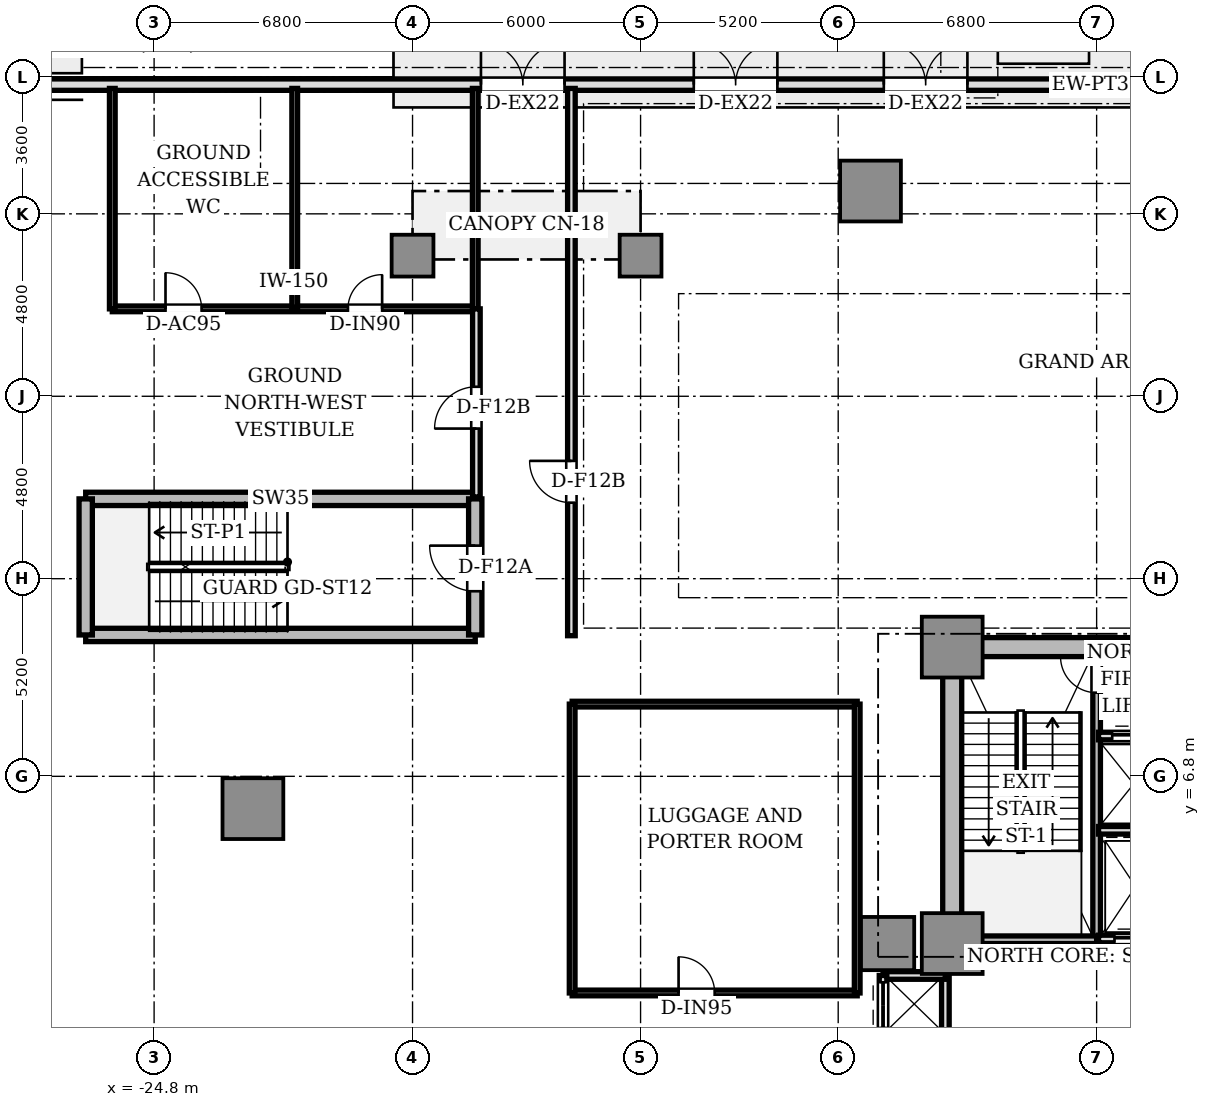
"""IFC4 building model, lengths in metres.
Left out: names, types, materials, properties, quantities, classifications, styles, units other than length and angle.
Written with IfcOpenShell. Run it as: python <this file> out.ifc"""

import sys

from ifc_helpers import new_model, si_unit, direction, frame, frame_2d, origin, origin_2d, place, context, subcontext, project, spatial, rectangle, circle, extrude, source, transform, mapped, element, fill, save


model = new_model("IFC4")
c1 = context("Model", 3, precision=1e-05, world=origin(), true_north=direction((0.0, 1.0)))
c2 = subcontext(c1, "Body", "Model", "MODEL_VIEW")
j1 = project(units=[si_unit("LENGTHUNIT", "METRE"), si_unit("PLANEANGLEUNIT", "RADIAN")], contexts=[c1])
p1 = place(None, origin())
s1 = spatial("IfcSite", under=j1, at=p1, CompositionType="ELEMENT")
p2 = place(p1, origin())
s2 = spatial("IfcBuilding", under=s1, at=p2, CompositionType="ELEMENT")
p3 = place(p2, origin())
s3 = spatial("IfcBuildingStorey", under=s2, at=p3, CompositionType="ELEMENT", Elevation=0.0)
p4 = place(p3, frame((-3.55, 10.2, 0.0), z_axis=(0.0, 0.0, 1.0), x_axis=(1.0, 0.0, 0.0)))
e1 = element("IfcWall", 1, at=p4, inside=s3, PredefinedType="SHEAR", context=c2, shape_type="SweptSolid", body=[
    extrude(rectangle(XDim=7.1, YDim=0.5, at=frame_2d((3.55, 0.0))), origin(), (0.0, 0.0, 1.0), 4.48),
])
p5 = place(p3, frame((-3.8, 2.85, 0.0), z_axis=(0.0, 0.0, 1.0), x_axis=(0.0, 1.0, 0.0)))
e2 = element("IfcWall", 2, at=p5, inside=s3, PredefinedType="SHEAR", context=c2, shape_type="SweptSolid", body=[
    extrude(rectangle(XDim=6.9, YDim=0.5, at=frame_2d((3.45, 0.0))), origin(), (0.0, 0.0, 1.0), 4.48),
])
m1 = source(origin(), c2, "Body", "SweptSolid", [
    extrude(rectangle(XDim=1.6, YDim=1.6, at=origin_2d()), origin(), (0.0, 0.0, 1.0), 4.48),
])
for number, where, z_axis, x_axis in (
    (3, (-3.8, 2.4, 0.0), (0.0, 0.0, 1.0), (1.0, 0.0, 0.0)),
    (4, (-3.8, 10.2, 0.0), (0.0, 0.0, 1.0), (1.0, 0.0, 0.0)),
):
    element("IfcColumn", number, at=place(p3, frame(where, z_axis=z_axis, x_axis=x_axis)), inside=s3, PredefinedType="COLUMN", context=c2, shape_type="MappedRepresentation", body=[
        mapped(m1, transform((0.0, 0.0, 0.0), scale=1.0)),
    ])
m2 = source(origin(), c2, "Body", "SweptSolid", [
    extrude(rectangle(XDim=1.4, YDim=1.4, at=origin_2d()), origin(), (0.0, 0.0, 1.0), 4.48),
])
p6 = place(p3, frame((-5.5, 2.4, 0.0), z_axis=(0.0, 0.0, 1.0), x_axis=(1.0, 0.0, 0.0)))
e5 = element("IfcColumn", 5, at=p6, inside=s3, PredefinedType="COLUMN", context=c2, shape_type="MappedRepresentation", body=[
    mapped(m2, transform((0.0, 0.0, 0.0), scale=1.0)),
])
for number, where, z_axis, x_axis in (
    (6, (-5.95, 22.2, 0.0), (0.0, 0.0, 1.0), (1.0, 0.0, 0.0)),
    (7, (-22.2, 5.95, 0.0), (0.0, 0.0, 1.0), (1.0, 0.0, 0.0)),
):
    element("IfcColumn", number, at=place(p3, frame(where, z_axis=z_axis, x_axis=x_axis)), inside=s3, PredefinedType="COLUMN", context=c2, shape_type="MappedRepresentation", body=[
        mapped(m1, transform((0.0, 0.0, 0.0), scale=1.0)),
    ])
m3 = source(origin(), c2, "Body", "SweptSolid", [
    extrude(circle(Radius=0.55, at=origin_2d()), origin(), (0.0, 0.0, 1.0), 4.48),
])
for number, where, z_axis, x_axis in (
    (8, (-18.0, 20.5, 0.0), (0.0, 0.0, 1.0), (1.0, 0.0, 0.0)),
    (9, (-12.0, 20.5, 0.0), (0.0, 0.0, 1.0), (1.0, 0.0, 0.0)),
):
    element("IfcColumn", number, at=place(p3, frame(where, z_axis=z_axis, x_axis=x_axis)), inside=s3, PredefinedType="COLUMN", context=c2, shape_type="MappedRepresentation", body=[
        mapped(m3, transform((0.0, 0.0, 0.0), scale=1.0)),
    ])
p7 = place(p3, frame((-33.4, 25.0, 0.0), z_axis=(0.0, 0.0, 1.0), x_axis=(1.0, 0.0, 0.0)))
e10 = element("IfcWall", 10, at=p7, inside=s3, PredefinedType="STANDARD", context=c2, shape_type="SweptSolid", body=[
    extrude(rectangle(XDim=66.8, YDim=0.3, at=frame_2d((33.4, 0.0))), origin(), (0.0, 0.0, 1.0), 3.8),
])
p8 = place(p7, frame((17.2, 0.0, 0.0)))
e11 = element("IfcOpeningElement", 11, at=p8, cuts=e10, PredefinedType="OPENING", context=c2, shape_type="SweptSolid", body=[
    extrude(rectangle(XDim=2.2, YDim=2.4, at=frame_2d((1.1, 1.2))), frame((0.0, 0.16, 0.0), z_axis=(0.0, -1.0, 0.0), x_axis=(1.0, 0.0, 0.0)), (0.0, 0.0, 1.0), 0.32),
])
p9 = place(p7, frame((22.8, 0.0, 0.0)))
e12 = element("IfcOpeningElement", 12, at=p9, cuts=e10, PredefinedType="OPENING", context=c2, shape_type="SweptSolid", body=[
    extrude(rectangle(XDim=2.2, YDim=2.4, at=frame_2d((1.1, 1.2))), frame((0.0, 0.16, 0.0), z_axis=(0.0, -1.0, 0.0), x_axis=(1.0, 0.0, 0.0)), (0.0, 0.0, 1.0), 0.32),
])
p10 = place(p7, frame((27.8, 0.0, 0.0)))
e13 = element("IfcOpeningElement", 13, at=p10, cuts=e10, PredefinedType="OPENING", context=c2, shape_type="SweptSolid", body=[
    extrude(rectangle(XDim=2.2, YDim=2.4, at=frame_2d((1.1, 1.2))), frame((0.0, 0.16, 0.0), z_axis=(0.0, -1.0, 0.0), x_axis=(1.0, 0.0, 0.0)), (0.0, 0.0, 1.0), 0.32),
])
p11 = place(p7, frame((36.8, 0.0, 0.0)))
e14 = element("IfcOpeningElement", 14, at=p11, cuts=e10, PredefinedType="OPENING", context=c2, shape_type="SweptSolid", body=[
    extrude(rectangle(XDim=2.2, YDim=2.4, at=frame_2d((1.1, 1.2))), frame((0.0, 0.16, 0.0), z_axis=(0.0, -1.0, 0.0), x_axis=(1.0, 0.0, 0.0)), (0.0, 0.0, 1.0), 0.32),
])
p12 = place(p7, frame((45.8, 0.0, 0.0)))
e15 = element("IfcOpeningElement", 15, at=p12, cuts=e10, PredefinedType="OPENING", context=c2, shape_type="SweptSolid", body=[
    extrude(rectangle(XDim=2.2, YDim=2.4, at=frame_2d((1.1, 1.2))), frame((0.0, 0.16, 0.0), z_axis=(0.0, -1.0, 0.0), x_axis=(1.0, 0.0, 0.0)), (0.0, 0.0, 1.0), 0.32),
])
p13 = place(p7, frame((55.8, 0.0, 0.0)))
e16 = element("IfcOpeningElement", 16, at=p13, cuts=e10, PredefinedType="OPENING", context=c2, shape_type="SweptSolid", body=[
    extrude(rectangle(XDim=1.2, YDim=2.2, at=frame_2d((0.6, 1.1))), frame((0.0, 0.16, 0.0), z_axis=(0.0, -1.0, 0.0), x_axis=(1.0, 0.0, 0.0)), (0.0, 0.0, 1.0), 0.32),
])
p14 = place(p3, frame((0.0, 2.5, 0.0), z_axis=(0.0, 0.0, 1.0), x_axis=(0.0, 1.0, 0.0)))
e17 = element("IfcWall", 17, at=p14, inside=s3, PredefinedType="SOLIDWALL", context=c2, shape_type="SweptSolid", body=[
    extrude(rectangle(XDim=7.68, YDim=0.2, at=frame_2d((3.84, 0.0))), origin(), (0.0, 0.0, 1.0), 4.48),
])
p15 = place(p14, frame((6.5, 0.0, 0.0)))
e18 = element("IfcOpeningElement", 18, at=p15, cuts=e17, PredefinedType="OPENING", context=c2, shape_type="SweptSolid", body=[
    extrude(rectangle(XDim=0.95, YDim=2.15, at=frame_2d((0.475, 1.075))), frame((0.0, 0.11, 0.0), z_axis=(0.0, -1.0, 0.0), x_axis=(1.0, 0.0, 0.0)), (0.0, 0.0, 1.0), 0.22),
])
p16 = place(p3, frame((-3.72, 2.5, 0.0), z_axis=(0.0, 0.0, 1.0), x_axis=(1.0, 0.0, 0.0)))
e19 = element("IfcWall", 19, at=p16, inside=s3, PredefinedType="SOLIDWALL", context=c2, shape_type="SweptSolid", body=[
    extrude(rectangle(XDim=3.72, YDim=0.2, at=frame_2d((1.86, 0.0))), origin(), (0.0, 0.0, 1.0), 4.48),
])
p17 = place(p3, frame((0.05, 2.52, 0.0), z_axis=(0.0, 0.0, 1.0), x_axis=(1.0, 0.0, 0.0)))
e20 = element("IfcWall", 20, at=p17, inside=s3, PredefinedType="SOLIDWALL", context=c2, shape_type="SweptSolid", body=[
    extrude(rectangle(XDim=1.95, YDim=0.2, at=frame_2d((0.975, 0.0))), origin(), (0.0, 0.0, 1.0), 4.03),
])
p18 = place(p17, frame((0.42, 0.0, 0.0)))
e21 = element("IfcOpeningElement", 21, at=p18, cuts=e20, PredefinedType="OPENING", context=c2, shape_type="SweptSolid", body=[
    extrude(rectangle(XDim=1.1, YDim=2.2, at=frame_2d((0.55, 1.1))), frame((0.0, 0.11, 0.0), z_axis=(0.0, -1.0, 0.0), x_axis=(1.0, 0.0, 0.0)), (0.0, 0.0, 1.0), 0.22),
])
p19 = place(p3, frame((0.05, 5.38, 0.0), z_axis=(0.0, 0.0, 1.0), x_axis=(1.0, 0.0, 0.0)))
e22 = element("IfcWall", 22, at=p19, inside=s3, PredefinedType="SOLIDWALL", context=c2, shape_type="SweptSolid", body=[
    extrude(rectangle(XDim=3.69, YDim=0.2, at=frame_2d((1.845, 0.0))), origin(), (0.0, 0.0, 1.0), 4.03),
])
p20 = place(p3, frame((0.05, 7.86, 0.0), z_axis=(0.0, 0.0, 1.0), x_axis=(1.0, 0.0, 0.0)))
e23 = element("IfcWall", 23, at=p20, inside=s3, PredefinedType="SOLIDWALL", context=c2, shape_type="SweptSolid", body=[
    extrude(rectangle(XDim=1.85, YDim=0.2, at=frame_2d((0.925, 0.0))), origin(), (0.0, 0.0, 1.0), 4.03),
])
p21 = place(p20, frame((0.36, 0.0, 0.0)))
e24 = element("IfcOpeningElement", 24, at=p21, cuts=e23, PredefinedType="OPENING", context=c2, shape_type="SweptSolid", body=[
    extrude(rectangle(XDim=1.1, YDim=2.2, at=frame_2d((0.55, 1.1))), frame((0.0, 0.11, 0.0), z_axis=(0.0, -1.0, 0.0), x_axis=(1.0, 0.0, 0.0)), (0.0, 0.0, 1.0), 0.22),
])
p22 = place(p3, frame((-3.98, -1.56, 0.0), z_axis=(0.0, 0.0, 1.0), x_axis=(0.0, 1.0, 0.0)))
e25 = element("IfcWall", 25, at=p22, inside=s3, PredefinedType="SOLIDWALL", context=c2, shape_type="SweptSolid", body=[
    extrude(rectangle(XDim=3.12, YDim=0.2, at=frame_2d((1.56, 0.0))), origin(), (0.0, 0.0, 1.0), 3.55),
])
p23 = place(p3, frame((-5.62, 1.56, 0.0), z_axis=(0.0, 0.0, 1.0), x_axis=(1.0, 0.0, 0.0)))
e26 = element("IfcWall", 26, at=p23, inside=s3, PredefinedType="SOLIDWALL", context=c2, shape_type="SweptSolid", body=[
    extrude(rectangle(XDim=1.64, YDim=0.2, at=frame_2d((0.82, 0.0))), origin(), (0.0, 0.0, 1.0), 4.03),
])
p24 = place(p3, frame((-5.62, 0.0, 0.0), z_axis=(0.0, 0.0, 1.0), x_axis=(0.0, 1.0, 0.0)))
e27 = element("IfcWall", 27, at=p24, inside=s3, PredefinedType="SOLIDWALL", context=c2, shape_type="SweptSolid", body=[
    extrude(rectangle(XDim=1.56, YDim=0.2, at=frame_2d((0.78, 0.0))), origin(), (0.0, 0.0, 1.0), 4.03),
])
p25 = place(p24, frame((0.18, 0.0, 0.0)))
e28 = element("IfcOpeningElement", 28, at=p25, cuts=e27, PredefinedType="OPENING", context=c2, shape_type="SweptSolid", body=[
    extrude(rectangle(XDim=1.2, YDim=2.2, at=frame_2d((0.6, 1.1))), frame((0.0, 0.11, 0.0), z_axis=(0.0, -1.0, 0.0), x_axis=(1.0, 0.0, 0.0)), (0.0, 0.0, 1.0), 0.22),
])
for number, where, z_axis, x_axis in (
    (29, (-26.6, 14.1, 0.0), (0.0, 0.0, 1.0), (1.0, 0.0, 0.0)),
    (30, (-26.6, 10.52, 0.0), (0.0, 0.0, 1.0), (1.0, 0.0, 0.0)),
):
    element("IfcWall", number, at=place(p3, frame(where, z_axis=z_axis, x_axis=x_axis)), inside=s3, PredefinedType="SHEAR", context=c2, shape_type="SweptSolid", body=[
        extrude(rectangle(XDim=10.25, YDim=0.35, at=frame_2d((5.125, 0.0))), origin(), (0.0, 0.0, 1.0), 4.48),
    ])
p26 = place(p3, frame((-26.6, 10.52, 0.0), z_axis=(0.0, 0.0, 1.0), x_axis=(0.0, 1.0, 0.0)))
e31 = element("IfcWall", 31, at=p26, inside=s3, PredefinedType="SHEAR", context=c2, shape_type="SweptSolid", body=[
    extrude(rectangle(XDim=3.58, YDim=0.35, at=frame_2d((1.79, 0.0))), origin(), (0.0, 0.0, 1.0), 4.48),
])
p27 = place(p3, frame((-16.35, 10.52, 0.0), z_axis=(0.0, 0.0, 1.0), x_axis=(0.0, 1.0, 0.0)))
e32 = element("IfcWall", 32, at=p27, inside=s3, PredefinedType="SHEAR", context=c2, shape_type="SweptSolid", body=[
    extrude(rectangle(XDim=3.58, YDim=0.35, at=frame_2d((1.79, 0.0))), origin(), (0.0, 0.0, 1.0), 4.48),
])
p28 = place(p27, frame((1.15, 0.0, 0.0)))
e33 = element("IfcOpeningElement", 33, at=p28, cuts=e32, PredefinedType="OPENING", context=c2, shape_type="SweptSolid", body=[
    extrude(rectangle(XDim=1.2, YDim=2.2, at=frame_2d((0.6, 1.1))), frame((0.0, 0.185, 0.0), z_axis=(0.0, -1.0, 0.0), x_axis=(1.0, 0.0, 0.0)), (0.0, 0.0, 1.0), 0.37),
])
p29 = place(p3, frame((-25.9, 19.1, 0.0), z_axis=(0.0, 0.0, 1.0), x_axis=(1.0, 0.0, 0.0)))
e34 = element("IfcWall", 34, at=p29, inside=s3, PredefinedType="PARTITIONING", context=c2, shape_type="SweptSolid", body=[
    extrude(rectangle(XDim=9.55, YDim=0.15, at=frame_2d((4.775, 0.0))), origin(), (0.0, 0.0, 1.0), 4.03),
])
p30 = place(p29, frame((1.4, 0.0, 0.0)))
e35 = element("IfcOpeningElement", 35, at=p30, cuts=e34, PredefinedType="OPENING", context=c2, shape_type="SweptSolid", body=[
    extrude(rectangle(XDim=0.95, YDim=2.15, at=frame_2d((0.475, 1.075))), frame((0.0, 0.085, 0.0), z_axis=(0.0, -1.0, 0.0), x_axis=(1.0, 0.0, 0.0)), (0.0, 0.0, 1.0), 0.17),
])
p31 = place(p29, frame((6.2, 0.0, 0.0)))
e36 = element("IfcOpeningElement", 36, at=p31, cuts=e34, PredefinedType="OPENING", context=c2, shape_type="SweptSolid", body=[
    extrude(rectangle(XDim=0.9, YDim=2.1, at=frame_2d((0.45, 1.05))), frame((0.0, 0.085, 0.0), z_axis=(0.0, -1.0, 0.0), x_axis=(1.0, 0.0, 0.0)), (0.0, 0.0, 1.0), 0.17),
])
for number, where, z_axis, x_axis in (
    (37, (-25.9, 19.1, 0.0), (0.0, 0.0, 1.0), (0.0, 1.0, 0.0)),
    (38, (-21.1, 19.1, 0.0), (0.0, 0.0, 1.0), (0.0, 1.0, 0.0)),
):
    element("IfcWall", number, at=place(p3, frame(where, z_axis=z_axis, x_axis=x_axis)), inside=s3, PredefinedType="PARTITIONING", context=c2, shape_type="SweptSolid", body=[
        extrude(rectangle(XDim=5.8, YDim=0.15, at=frame_2d((2.9, 0.0))), origin(), (0.0, 0.0, 1.0), 4.03),
    ])
p32 = place(p3, frame((-16.35, 19.1, 0.0), z_axis=(0.0, 0.0, 1.0), x_axis=(0.0, 1.0, 0.0)))
e39 = element("IfcWall", 39, at=p32, inside=s3, PredefinedType="PARTITIONING", context=c2, shape_type="SweptSolid", body=[
    extrude(rectangle(XDim=5.8, YDim=0.15, at=frame_2d((2.9, 0.0))), origin(), (0.0, 0.0, 1.0), 3.95),
])
p33 = place(p3, frame((-13.8, 1.1, 0.0), z_axis=(0.0, 0.0, 1.0), x_axis=(1.0, 0.0, 0.0)))
e40 = element("IfcWall", 40, at=p33, inside=s3, PredefinedType="PARTITIONING", context=c2, shape_type="SweptSolid", body=[
    extrude(rectangle(XDim=7.5, YDim=0.15, at=frame_2d((3.75, 0.0))), origin(), (0.0, 0.0, 1.0), 4.03),
])
p34 = place(p33, frame((2.8, 0.0, 0.0)))
e41 = element("IfcOpeningElement", 41, at=p34, cuts=e40, PredefinedType="OPENING", context=c2, shape_type="SweptSolid", body=[
    extrude(rectangle(XDim=0.95, YDim=2.15, at=frame_2d((0.475, 1.075))), frame((0.0, 0.085, 0.0), z_axis=(0.0, -1.0, 0.0), x_axis=(1.0, 0.0, 0.0)), (0.0, 0.0, 1.0), 0.17),
])
p35 = place(p3, frame((-13.8, 8.7, 0.0), z_axis=(0.0, 0.0, 1.0), x_axis=(1.0, 0.0, 0.0)))
e42 = element("IfcWall", 42, at=p35, inside=s3, PredefinedType="PARTITIONING", context=c2, shape_type="SweptSolid", body=[
    extrude(rectangle(XDim=7.5, YDim=0.15, at=frame_2d((3.75, 0.0))), origin(), (0.0, 0.0, 1.0), 4.03),
])
for number, where, z_axis, x_axis in (
    (43, (-13.8, 1.1, 0.0), (0.0, 0.0, 1.0), (0.0, 1.0, 0.0)),
    (44, (-6.3, 1.1, 0.0), (0.0, 0.0, 1.0), (0.0, 1.0, 0.0)),
):
    element("IfcWall", number, at=place(p3, frame(where, z_axis=z_axis, x_axis=x_axis)), inside=s3, PredefinedType="PARTITIONING", context=c2, shape_type="SweptSolid", body=[
        extrude(rectangle(XDim=7.6, YDim=0.15, at=frame_2d((3.8, 0.0))), origin(), (0.0, 0.0, 1.0), 4.03),
    ])
p36 = place(p3, frame((-13.82, 10.5, 0.0), z_axis=(0.0, 0.0, 1.0), x_axis=(0.0, 1.0, 0.0)))
e45 = element("IfcWall", 45, at=p36, inside=s3, PredefinedType="SOLIDWALL", context=c2, shape_type="SweptSolid", body=[
    extrude(rectangle(XDim=14.4, YDim=0.2, at=frame_2d((7.2, 0.0))), origin(), (0.0, 0.0, 1.0), 4.03),
])
p37 = place(p36, frame((3.5, 0.0, 0.0)))
e46 = element("IfcOpeningElement", 46, at=p37, cuts=e45, PredefinedType="OPENING", context=c2, shape_type="SweptSolid", body=[
    extrude(rectangle(XDim=1.1, YDim=2.15, at=frame_2d((0.55, 1.075))), frame((0.0, 0.11, 0.0), z_axis=(0.0, -1.0, 0.0), x_axis=(1.0, 0.0, 0.0)), (0.0, 0.0, 1.0), 0.22),
])
p38 = place(p3, frame((-16.32, 14.15, 0.0), z_axis=(0.0, 0.0, 1.0), x_axis=(0.0, 1.0, 0.0)))
e47 = element("IfcWall", 47, at=p38, inside=s3, PredefinedType="SOLIDWALL", context=c2, shape_type="SweptSolid", body=[
    extrude(rectangle(XDim=4.95, YDim=0.2, at=frame_2d((2.475, 0.0))), origin(), (0.0, 0.0, 1.0), 4.03),
])
p39 = place(p38, frame((1.8, 0.0, 0.0)))
e48 = element("IfcOpeningElement", 48, at=p39, cuts=e47, PredefinedType="OPENING", context=c2, shape_type="SweptSolid", body=[
    extrude(rectangle(XDim=1.1, YDim=2.15, at=frame_2d((0.55, 1.075))), frame((0.0, 0.11, 0.0), z_axis=(0.0, -1.0, 0.0), x_axis=(1.0, 0.0, 0.0)), (0.0, 0.0, 1.0), 0.22),
])
p40 = place(p3, frame((0.12, 8.68, 0.0), z_axis=(0.0, 0.0, 1.0), x_axis=(1.0, 0.0, 0.0)))
e49 = element("IfcWall", 49, at=p40, inside=s3, PredefinedType="SOLIDWALL", context=c2, shape_type="SweptSolid", body=[
    extrude(rectangle(XDim=4.5, YDim=0.2, at=frame_2d((2.25, 0.0))), origin(), (0.0, 0.0, 1.0), 4.03),
])
m4 = source(origin(), c2, "Body", "SweptSolid", [
    extrude(rectangle(XDim=2.2, YDim=0.05, at=origin_2d()), origin(), (0.0, 0.0, 1.0), 2.4),
])
p41 = place(p8, frame((1.1, 0.0, 0.0)))
e50 = element("IfcDoor", 50, at=p41, inside=s3, OperationType="DOUBLE_DOOR_SINGLE_SWING", PredefinedType="DOOR", context=c2, shape_type="MappedRepresentation", body=[
    mapped(m4, transform((0.0, 0.0, 0.0), scale=1.0)),
])
fill(e11, e50)
p42 = place(p9, frame((1.1, 0.0, 0.0)))
e51 = element("IfcDoor", 51, at=p42, inside=s3, OperationType="DOUBLE_DOOR_SINGLE_SWING", PredefinedType="DOOR", context=c2, shape_type="MappedRepresentation", body=[
    mapped(m4, transform((0.0, 0.0, 0.0), scale=1.0)),
])
fill(e12, e51)
p43 = place(p10, frame((1.1, 0.0, 0.0)))
e52 = element("IfcDoor", 52, at=p43, inside=s3, OperationType="DOUBLE_DOOR_SINGLE_SWING", PredefinedType="DOOR", context=c2, shape_type="MappedRepresentation", body=[
    mapped(m4, transform((0.0, 0.0, 0.0), scale=1.0)),
])
fill(e13, e52)
m5 = source(origin(), c2, "Body", "SweptSolid", [
    extrude(rectangle(XDim=1.1, YDim=0.05, at=origin_2d()), origin(), (0.0, 0.0, 1.0), 2.2),
])
p44 = place(p18, frame((0.55, 0.0, 0.0)))
e53 = element("IfcDoor", 53, at=p44, inside=s3, OperationType="DOUBLE_DOOR_SLIDING", PredefinedType="DOOR", context=c2, shape_type="MappedRepresentation", body=[
    mapped(m5, transform((0.0, 0.0, 0.0), scale=1.0)),
])
fill(e21, e53)
p45 = place(p21, frame((0.55, 0.0, 0.0)))
e54 = element("IfcDoor", 54, at=p45, inside=s3, OperationType="DOUBLE_DOOR_SLIDING", PredefinedType="DOOR", context=c2, shape_type="MappedRepresentation", body=[
    mapped(m5, transform((0.0, 0.0, 0.0), scale=1.0)),
])
fill(e24, e54)
m6 = source(origin(), c2, "Body", "SweptSolid", [
    extrude(rectangle(XDim=1.2, YDim=0.05, at=origin_2d()), origin(), (0.0, 0.0, 1.0), 2.2),
])
p46 = place(p25, frame((0.6, 0.0, 0.0)))
e55 = element("IfcDoor", 55, at=p46, inside=s3, OperationType="DOUBLE_DOOR_SLIDING", PredefinedType="DOOR", context=c2, shape_type="MappedRepresentation", body=[
    mapped(m6, transform((0.0, 0.0, 0.0), scale=1.0)),
])
fill(e28, e55)
m7 = source(origin(), c2, "Body", "SweptSolid", [
    extrude(rectangle(XDim=0.95, YDim=0.05, at=origin_2d()), origin(), (0.0, 0.0, 1.0), 2.15),
])
p47 = place(p15, frame((0.475, 0.0, 0.0)))
e56 = element("IfcDoor", 56, at=p47, inside=s3, OperationType="SINGLE_SWING_RIGHT", PredefinedType="DOOR", context=c2, shape_type="MappedRepresentation", body=[
    mapped(m7, transform((0.0, 0.0, 0.0), scale=1.0)),
])
fill(e18, e56)
p48 = place(p28, frame((0.6, 0.0, 0.0)))
e57 = element("IfcDoor", 57, at=p48, inside=s3, OperationType="SINGLE_SWING_RIGHT", PredefinedType="DOOR", context=c2, shape_type="MappedRepresentation", body=[
    mapped(m6, transform((0.0, 0.0, 0.0), scale=1.0)),
])
fill(e33, e57)
p49 = place(p30, frame((0.475, 0.0, 0.0)))
e58 = element("IfcDoor", 58, at=p49, inside=s3, OperationType="SINGLE_SWING_LEFT", PredefinedType="DOOR", context=c2, shape_type="MappedRepresentation", body=[
    mapped(m7, transform((0.0, 0.0, 0.0), scale=1.0)),
])
fill(e35, e58)
m8 = source(origin(), c2, "Body", "SweptSolid", [
    extrude(rectangle(XDim=0.9, YDim=0.05, at=origin_2d()), origin(), (0.0, 0.0, 1.0), 2.1),
])
p50 = place(p31, frame((0.45, 0.0, 0.0)))
e59 = element("IfcDoor", 59, at=p50, inside=s3, OperationType="SINGLE_SWING_RIGHT", PredefinedType="DOOR", context=c2, shape_type="MappedRepresentation", body=[
    mapped(m8, transform((0.0, 0.0, 0.0), scale=1.0)),
])
fill(e36, e59)
p51 = place(p34, frame((0.475, 0.0, 0.0)))
e60 = element("IfcDoor", 60, at=p51, inside=s3, OperationType="SINGLE_SWING_LEFT", PredefinedType="DOOR", context=c2, shape_type="MappedRepresentation", body=[
    mapped(m7, transform((0.0, 0.0, 0.0), scale=1.0)),
])
fill(e41, e60)
m9 = source(origin(), c2, "Body", "SweptSolid", [
    extrude(rectangle(XDim=1.1, YDim=0.05, at=origin_2d()), origin(), (0.0, 0.0, 1.0), 2.15),
])
p52 = place(p37, frame((0.55, 0.0, 0.0)))
e61 = element("IfcDoor", 61, at=p52, inside=s3, OperationType="SINGLE_SWING_RIGHT", PredefinedType="DOOR", context=c2, shape_type="MappedRepresentation", body=[
    mapped(m9, transform((0.0, 0.0, 0.0), scale=1.0)),
])
fill(e46, e61)
p53 = place(p39, frame((0.55, 0.0, 0.0)))
e62 = element("IfcDoor", 62, at=p53, inside=s3, OperationType="SINGLE_SWING_LEFT", PredefinedType="DOOR", context=c2, shape_type="MappedRepresentation", body=[
    mapped(m9, transform((0.0, 0.0, 0.0), scale=1.0)),
])
fill(e48, e62)
save(model, sys.argv[1])
